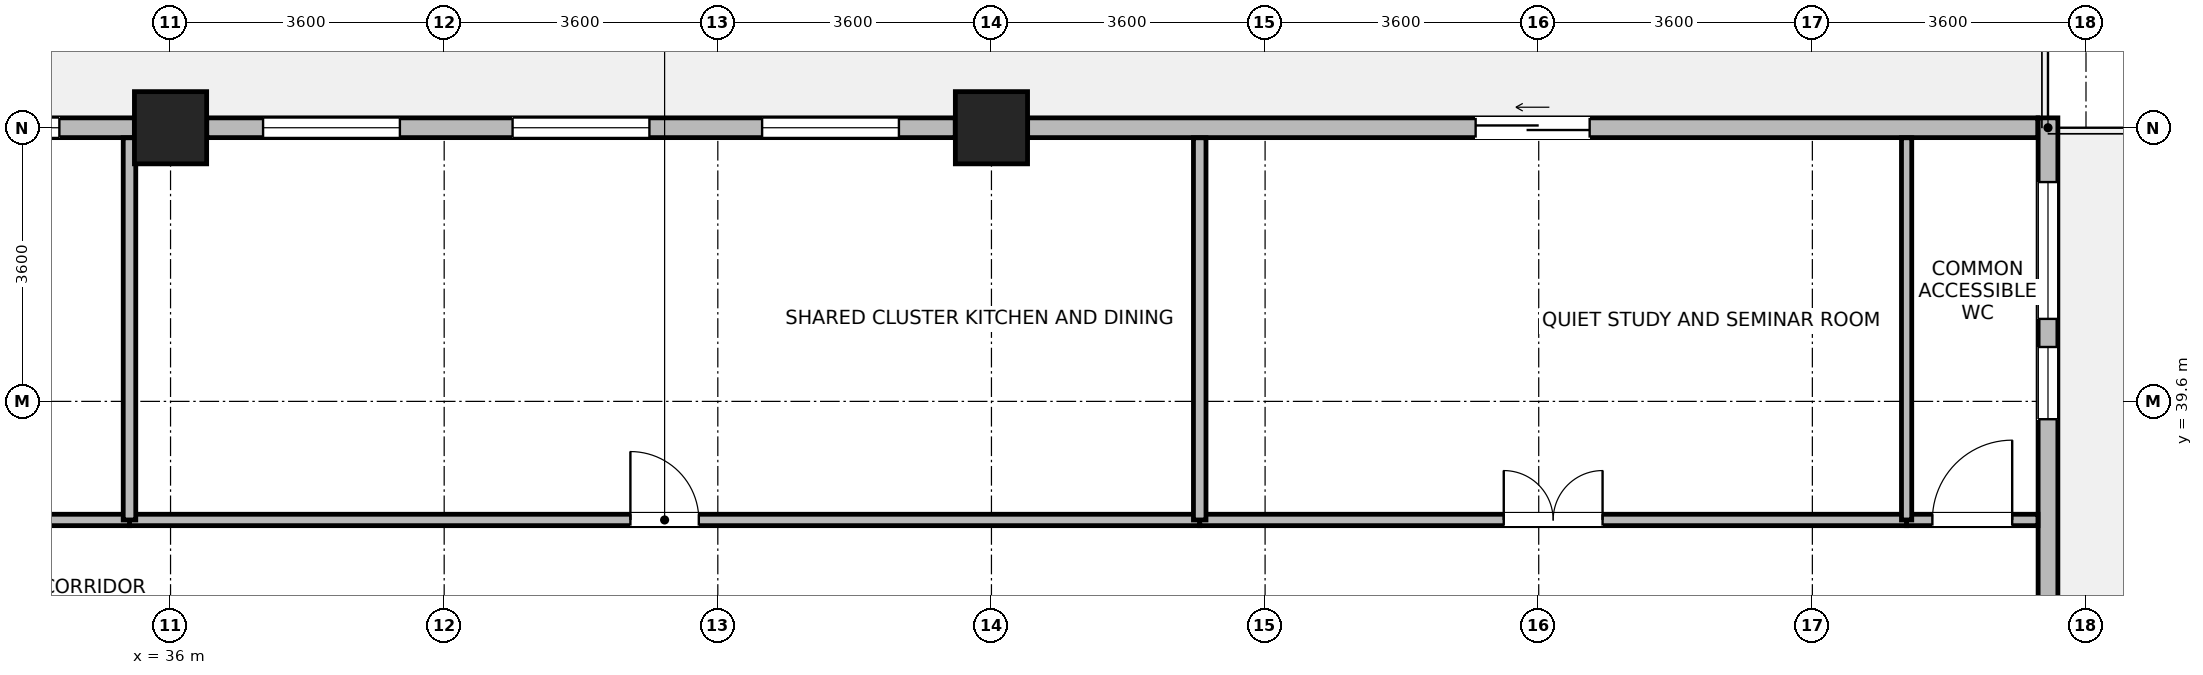
"""IFC4 building model, lengths in metres.
Left out: names, types, materials, properties, quantities, classifications, styles, units other than length and angle.
Written with IfcOpenShell. Run it as: python <this file> out.ifc"""

import sys

from ifc_helpers import new_model, si_unit, direction, frame, frame_2d, origin, origin_2d, place, context, subcontext, project, spatial, rectangle, extrude, source, transform, mapped, element, fill, save


model = new_model("IFC4")
c1 = context("Model", 3, precision=1e-05, world=origin(), true_north=direction((0.0, 1.0)))
c2 = subcontext(c1, "Body", "Model", "MODEL_VIEW")
j1 = project(units=[si_unit("LENGTHUNIT", "METRE"), si_unit("PLANEANGLEUNIT", "RADIAN")], contexts=[c1])
p1 = place(None, origin())
s1 = spatial("IfcSite", under=j1, at=p1, CompositionType="ELEMENT")
p2 = place(p1, origin())
s2 = spatial("IfcBuilding", under=s1, at=p2, CompositionType="ELEMENT")
p3 = place(p2, frame((0.0, 0.0, 205.5)))
s3 = spatial("IfcBuildingStorey", under=s2, at=p3, CompositionType="ELEMENT", Elevation=205.5)
m1 = source(origin(), c2, "Body", "SweptSolid", [
    extrude(rectangle(XDim=0.95, YDim=0.95, at=origin_2d()), origin(), (0.0, 0.0, 1.0), 3.7),
])
for number, where, z_axis, x_axis in (
    (1, (36.0, 43.2, 0.0), (0.0, 0.0, 1.0), (1.0, 0.0, 0.0)),
    (2, (46.8, 43.2, 0.0), (0.0, 0.0, 1.0), (1.0, 0.0, 0.0)),
):
    element("IfcColumn", number, at=place(p3, frame(where, z_axis=z_axis, x_axis=x_axis)), inside=s3, PredefinedType="COLUMN", context=c2, shape_type="MappedRepresentation", body=[
        mapped(m1, transform((0.0, 0.0, 0.0), x_axis=(1.0, 0.0, 0.0), y_axis=(0.0, 1.0, 0.0), z_axis=(0.0, 0.0, 1.0), scale=1.0)),
    ])
p4 = place(p3, frame((60.7, 43.33, 0.0), z_axis=(0.0, 0.0, 1.0), x_axis=(0.0, -1.0, 0.0)))
e3 = element("IfcWall", 3, at=p4, inside=s3, PredefinedType="STANDARD", context=c2, shape_type="SweptSolid", body=[
    extrude(rectangle(XDim=6.979, YDim=0.26, at=frame_2d((3.49, 0.0))), origin(), (0.0, 0.0, 1.0), 3.45),
])
p5 = place(p4, frame((0.845, 0.0, 0.85)))
e4 = element("IfcOpeningElement", 4, at=p5, cuts=e3, PredefinedType="OPENING", context=c2, shape_type="SweptSolid", body=[
    extrude(rectangle(XDim=1.8, YDim=1.85, at=frame_2d((0.9, 0.925))), frame((0.0, 0.14, 0.0), z_axis=(0.0, -1.0, 0.0), x_axis=(1.0, 0.0, 0.0)), (0.0, 0.0, 1.0), 0.28),
])
p6 = place(p4, frame((3.014, 0.0, 0.85)))
e5 = element("IfcOpeningElement", 5, at=p6, cuts=e3, PredefinedType="OPENING", context=c2, shape_type="SweptSolid", body=[
    extrude(rectangle(XDim=0.95, YDim=1.75, at=frame_2d((0.475, 0.875))), frame((0.0, 0.14, 0.0), z_axis=(0.0, -1.0, 0.0), x_axis=(1.0, 0.0, 0.0)), (0.0, 0.0, 1.0), 0.28),
])
p7 = place(p3, frame((47.276, 43.2, 0.0), z_axis=(0.0, 0.0, 1.0), x_axis=(1.0, 0.0, 0.0)))
e6 = element("IfcWall", 6, at=p7, inside=s3, PredefinedType="STANDARD", context=c2, shape_type="SweptSolid", body=[
    extrude(rectangle(XDim=13.289, YDim=0.26, at=frame_2d((6.645, 0.0))), origin(), (0.0, 0.0, 1.0), 3.45),
])
p8 = place(p7, frame((5.894, 0.0, 0.0)))
e7 = element("IfcOpeningElement", 7, at=p8, cuts=e6, PredefinedType="OPENING", context=c2, shape_type="SweptSolid", body=[
    extrude(rectangle(XDim=1.5, YDim=2.15, at=frame_2d((0.75, 1.075))), frame((0.0, 0.14, 0.0), z_axis=(0.0, -1.0, 0.0), x_axis=(1.0, 0.0, 0.0)), (0.0, 0.0, 1.0), 0.28),
])
p9 = place(p3, frame((36.476, 43.2, 0.0), z_axis=(0.0, 0.0, 1.0), x_axis=(1.0, 0.0, 0.0)))
e8 = element("IfcWall", 8, at=p9, inside=s3, PredefinedType="STANDARD", context=c2, shape_type="SweptSolid", body=[
    extrude(rectangle(XDim=9.848, YDim=0.26, at=frame_2d((4.924, 0.0))), origin(), (0.0, 0.0, 1.0), 3.0),
])
p10 = place(p9, frame((0.741, 0.0, 0.85)))
e9 = element("IfcOpeningElement", 9, at=p10, cuts=e8, PredefinedType="OPENING", context=c2, shape_type="SweptSolid", body=[
    extrude(rectangle(XDim=1.8, YDim=1.85, at=frame_2d((0.9, 0.925))), frame((0.0, 0.14, 0.0), z_axis=(0.0, -1.0, 0.0), x_axis=(1.0, 0.0, 0.0)), (0.0, 0.0, 1.0), 0.28),
])
p11 = place(p9, frame((4.024, 0.0, 0.85)))
e10 = element("IfcOpeningElement", 10, at=p11, cuts=e8, PredefinedType="OPENING", context=c2, shape_type="SweptSolid", body=[
    extrude(rectangle(XDim=1.8, YDim=1.85, at=frame_2d((0.9, 0.925))), frame((0.0, 0.14, 0.0), z_axis=(0.0, -1.0, 0.0), x_axis=(1.0, 0.0, 0.0)), (0.0, 0.0, 1.0), 0.28),
])
p12 = place(p9, frame((7.307, 0.0, 0.85)))
e11 = element("IfcOpeningElement", 11, at=p12, cuts=e8, PredefinedType="OPENING", context=c2, shape_type="SweptSolid", body=[
    extrude(rectangle(XDim=1.8, YDim=1.85, at=frame_2d((0.9, 0.925))), frame((0.0, 0.14, 0.0), z_axis=(0.0, -1.0, 0.0), x_axis=(1.0, 0.0, 0.0)), (0.0, 0.0, 1.0), 0.28),
])
p13 = place(p3, frame((32.601, 43.2, 0.0), z_axis=(0.0, 0.0, 1.0), x_axis=(1.0, 0.0, 0.0)))
e12 = element("IfcWall", 12, at=p13, inside=s3, PredefinedType="STANDARD", context=c2, shape_type="SweptSolid", body=[
    extrude(rectangle(XDim=2.923, YDim=0.26, at=frame_2d((1.462, 0.0))), origin(), (0.0, 0.0, 1.0), 3.0),
])
p14 = place(p13, frame((0.987, 0.0, 0.85)))
e13 = element("IfcOpeningElement", 13, at=p14, cuts=e12, PredefinedType="OPENING", context=c2, shape_type="SweptSolid", body=[
    extrude(rectangle(XDim=0.95, YDim=1.75, at=frame_2d((0.475, 0.875))), frame((0.0, 0.14, 0.0), z_axis=(0.0, -1.0, 0.0), x_axis=(1.0, 0.0, 0.0)), (0.0, 0.0, 1.0), 0.28),
])
p15 = place(p3, frame((35.46, 38.04, 0.0), z_axis=(0.0, 0.0, 1.0), x_axis=(1.0, 0.0, 0.0)))
e14 = element("IfcWall", 14, at=p15, inside=s3, PredefinedType="PARTITIONING", context=c2, shape_type="SweptSolid", body=[
    extrude(rectangle(XDim=14.08, YDim=0.15, at=frame_2d((7.04, 0.0))), origin(), (0.0, 0.0, 1.0), 3.45),
])
p16 = place(p15, frame((6.59, 0.0, 0.0)))
e15 = element("IfcOpeningElement", 15, at=p16, cuts=e14, PredefinedType="OPENING", context=c2, shape_type="SweptSolid", body=[
    extrude(rectangle(XDim=0.9, YDim=2.08, at=frame_2d((0.45, 1.04))), frame((0.0, 0.085, 0.0), z_axis=(0.0, -1.0, 0.0), x_axis=(1.0, 0.0, 0.0)), (0.0, 0.0, 1.0), 0.17),
])
p17 = place(p3, frame((24.56, 38.04, 0.0), z_axis=(0.0, 0.0, 1.0), x_axis=(1.0, 0.0, 0.0)))
e16 = element("IfcWall", 16, at=p17, inside=s3, PredefinedType="PARTITIONING", context=c2, shape_type="SweptSolid", body=[
    extrude(rectangle(XDim=10.9, YDim=0.15, at=frame_2d((5.45, 0.0))), origin(), (0.0, 0.0, 1.0), 3.45),
])
p18 = place(p17, frame((4.8, 0.0, 0.0)))
e17 = element("IfcOpeningElement", 17, at=p18, cuts=e16, PredefinedType="OPENING", context=c2, shape_type="SweptSolid", body=[
    extrude(rectangle(XDim=1.3, YDim=2.12, at=frame_2d((0.65, 1.06))), frame((0.0, 0.085, 0.0), z_axis=(0.0, -1.0, 0.0), x_axis=(1.0, 0.0, 0.0)), (0.0, 0.0, 1.0), 0.17),
])
p19 = place(p3, frame((49.54, 38.04, 0.0), z_axis=(0.0, 0.0, 1.0), x_axis=(1.0, 0.0, 0.0)))
e18 = element("IfcWall", 18, at=p19, inside=s3, PredefinedType="PARTITIONING", context=c2, shape_type="SweptSolid", body=[
    extrude(rectangle(XDim=9.3, YDim=0.15, at=frame_2d((4.65, 0.0))), origin(), (0.0, 0.0, 1.0), 3.45),
])
p20 = place(p19, frame((4.0, 0.0, 0.0)))
e19 = element("IfcOpeningElement", 19, at=p20, cuts=e18, PredefinedType="OPENING", context=c2, shape_type="SweptSolid", body=[
    extrude(rectangle(XDim=1.3, YDim=2.12, at=frame_2d((0.65, 1.06))), frame((0.0, 0.085, 0.0), z_axis=(0.0, -1.0, 0.0), x_axis=(1.0, 0.0, 0.0)), (0.0, 0.0, 1.0), 0.17),
])
p21 = place(p3, frame((58.84, 38.04, 0.0), z_axis=(0.0, 0.0, 1.0), x_axis=(1.0, 0.0, 0.0)))
e20 = element("IfcWall", 20, at=p21, inside=s3, PredefinedType="PARTITIONING", context=c2, shape_type="SweptSolid", body=[
    extrude(rectangle(XDim=1.728, YDim=0.15, at=frame_2d((0.864, 0.0))), origin(), (0.0, 0.0, 1.0), 3.45),
])
p22 = place(p21, frame((0.339, 0.0, 0.0)))
e21 = element("IfcOpeningElement", 21, at=p22, cuts=e20, PredefinedType="OPENING", context=c2, shape_type="SweptSolid", body=[
    extrude(rectangle(XDim=1.05, YDim=2.12, at=frame_2d((0.525, 1.06))), frame((0.0, 0.085, 0.0), z_axis=(0.0, -1.0, 0.0), x_axis=(1.0, 0.0, 0.0)), (0.0, 0.0, 1.0), 0.17),
])
for number, where, z_axis, x_axis in (
    (22, (35.46, 38.04, 0.0), (0.0, 0.0, 1.0), (0.0, 1.0, 0.0)),
    (23, (49.54, 38.04, 0.0), (0.0, 0.0, 1.0), (0.0, 1.0, 0.0)),
):
    element("IfcWall", number, at=place(p3, frame(where, z_axis=z_axis, x_axis=x_axis)), inside=s3, PredefinedType="PARTITIONING", context=c2, shape_type="SweptSolid", body=[
        extrude(rectangle(XDim=5.028, YDim=0.165, at=frame_2d((2.514, 0.0))), origin(), (0.0, 0.0, 1.0), 3.45),
    ])
p23 = place(p3, frame((58.84, 38.04, 0.0), z_axis=(0.0, 0.0, 1.0), x_axis=(0.0, 1.0, 0.0)))
e24 = element("IfcWall", 24, at=p23, inside=s3, PredefinedType="PARTITIONING", context=c2, shape_type="SweptSolid", body=[
    extrude(rectangle(XDim=5.028, YDim=0.135, at=frame_2d((2.514, 0.0))), origin(), (0.0, 0.0, 1.0), 3.45),
])
p24 = place(p5, origin())
e25 = element("IfcWindow", 25, at=p24, inside=s3, PartitioningType="SINGLE_PANEL", PredefinedType="WINDOW", context=c2, shape_type="SweptSolid", body=[
    extrude(rectangle(XDim=1.8, YDim=1.85, at=frame_2d((0.9, 0.925))), frame((0.0, 0.03, 0.0), z_axis=(0.0, -1.0, 0.0), x_axis=(1.0, 0.0, 0.0)), (0.0, 0.0, 1.0), 0.06),
])
fill(e4, e25)
p25 = place(p6, origin())
e26 = element("IfcWindow", 26, at=p25, inside=s3, PartitioningType="SINGLE_PANEL", PredefinedType="WINDOW", context=c2, shape_type="SweptSolid", body=[
    extrude(rectangle(XDim=0.95, YDim=1.75, at=frame_2d((0.475, 0.875))), frame((0.0, 0.03, 0.0), z_axis=(0.0, -1.0, 0.0), x_axis=(1.0, 0.0, 0.0)), (0.0, 0.0, 1.0), 0.06),
])
fill(e5, e26)
p26 = place(p8, origin())
e27 = element("IfcDoor", 27, at=p26, inside=s3, OperationType="SLIDING_TO_LEFT", PredefinedType="DOOR", context=c2, shape_type="SweptSolid", body=[
    extrude(rectangle(XDim=1.5, YDim=2.15, at=frame_2d((0.75, 1.075))), frame((0.0, 0.025, 0.0), z_axis=(0.0, -1.0, 0.0), x_axis=(1.0, 0.0, 0.0)), (0.0, 0.0, 1.0), 0.05),
])
fill(e7, e27)
p27 = place(p10, origin())
e28 = element("IfcWindow", 28, at=p27, inside=s3, PartitioningType="SINGLE_PANEL", PredefinedType="WINDOW", context=c2, shape_type="SweptSolid", body=[
    extrude(rectangle(XDim=1.8, YDim=1.85, at=frame_2d((0.9, 0.925))), frame((0.0, 0.03, 0.0), z_axis=(0.0, -1.0, 0.0), x_axis=(1.0, 0.0, 0.0)), (0.0, 0.0, 1.0), 0.06),
])
fill(e9, e28)
p28 = place(p11, origin())
e29 = element("IfcWindow", 29, at=p28, inside=s3, PartitioningType="SINGLE_PANEL", PredefinedType="WINDOW", context=c2, shape_type="SweptSolid", body=[
    extrude(rectangle(XDim=1.8, YDim=1.85, at=frame_2d((0.9, 0.925))), frame((0.0, 0.03, 0.0), z_axis=(0.0, -1.0, 0.0), x_axis=(1.0, 0.0, 0.0)), (0.0, 0.0, 1.0), 0.06),
])
fill(e10, e29)
p29 = place(p12, origin())
e30 = element("IfcWindow", 30, at=p29, inside=s3, PartitioningType="SINGLE_PANEL", PredefinedType="WINDOW", context=c2, shape_type="SweptSolid", body=[
    extrude(rectangle(XDim=1.8, YDim=1.85, at=frame_2d((0.9, 0.925))), frame((0.0, 0.03, 0.0), z_axis=(0.0, -1.0, 0.0), x_axis=(1.0, 0.0, 0.0)), (0.0, 0.0, 1.0), 0.06),
])
fill(e11, e30)
p30 = place(p14, origin())
e31 = element("IfcWindow", 31, at=p30, inside=s3, PartitioningType="SINGLE_PANEL", PredefinedType="WINDOW", context=c2, shape_type="SweptSolid", body=[
    extrude(rectangle(XDim=0.95, YDim=1.75, at=frame_2d((0.475, 0.875))), frame((0.0, 0.03, 0.0), z_axis=(0.0, -1.0, 0.0), x_axis=(1.0, 0.0, 0.0)), (0.0, 0.0, 1.0), 0.06),
])
fill(e13, e31)
p31 = place(p16, origin())
e32 = element("IfcDoor", 32, at=p31, inside=s3, OperationType="SINGLE_SWING_LEFT", PredefinedType="DOOR", context=c2, shape_type="SweptSolid", body=[
    extrude(rectangle(XDim=0.9, YDim=2.08, at=frame_2d((0.45, 1.04))), frame((0.0, 0.025, 0.0), z_axis=(0.0, -1.0, 0.0), x_axis=(1.0, 0.0, 0.0)), (0.0, 0.0, 1.0), 0.05),
])
fill(e15, e32)
p32 = place(p20, origin())
e33 = element("IfcDoor", 33, at=p32, inside=s3, OperationType="DOUBLE_DOOR_SINGLE_SWING", PredefinedType="DOOR", context=c2, shape_type="SweptSolid", body=[
    extrude(rectangle(XDim=1.3, YDim=2.12, at=frame_2d((0.65, 1.06))), frame((0.0, 0.025, 0.0), z_axis=(0.0, -1.0, 0.0), x_axis=(1.0, 0.0, 0.0)), (0.0, 0.0, 1.0), 0.05),
])
fill(e19, e33)
p33 = place(p22, origin())
e34 = element("IfcDoor", 34, at=p33, inside=s3, OperationType="SINGLE_SWING_RIGHT", PredefinedType="DOOR", context=c2, shape_type="SweptSolid", body=[
    extrude(rectangle(XDim=1.05, YDim=2.12, at=frame_2d((0.525, 1.06))), frame((0.0, 0.025, 0.0), z_axis=(0.0, -1.0, 0.0), x_axis=(1.0, 0.0, 0.0)), (0.0, 0.0, 1.0), 0.05),
])
fill(e21, e34)
save(model, sys.argv[1])
